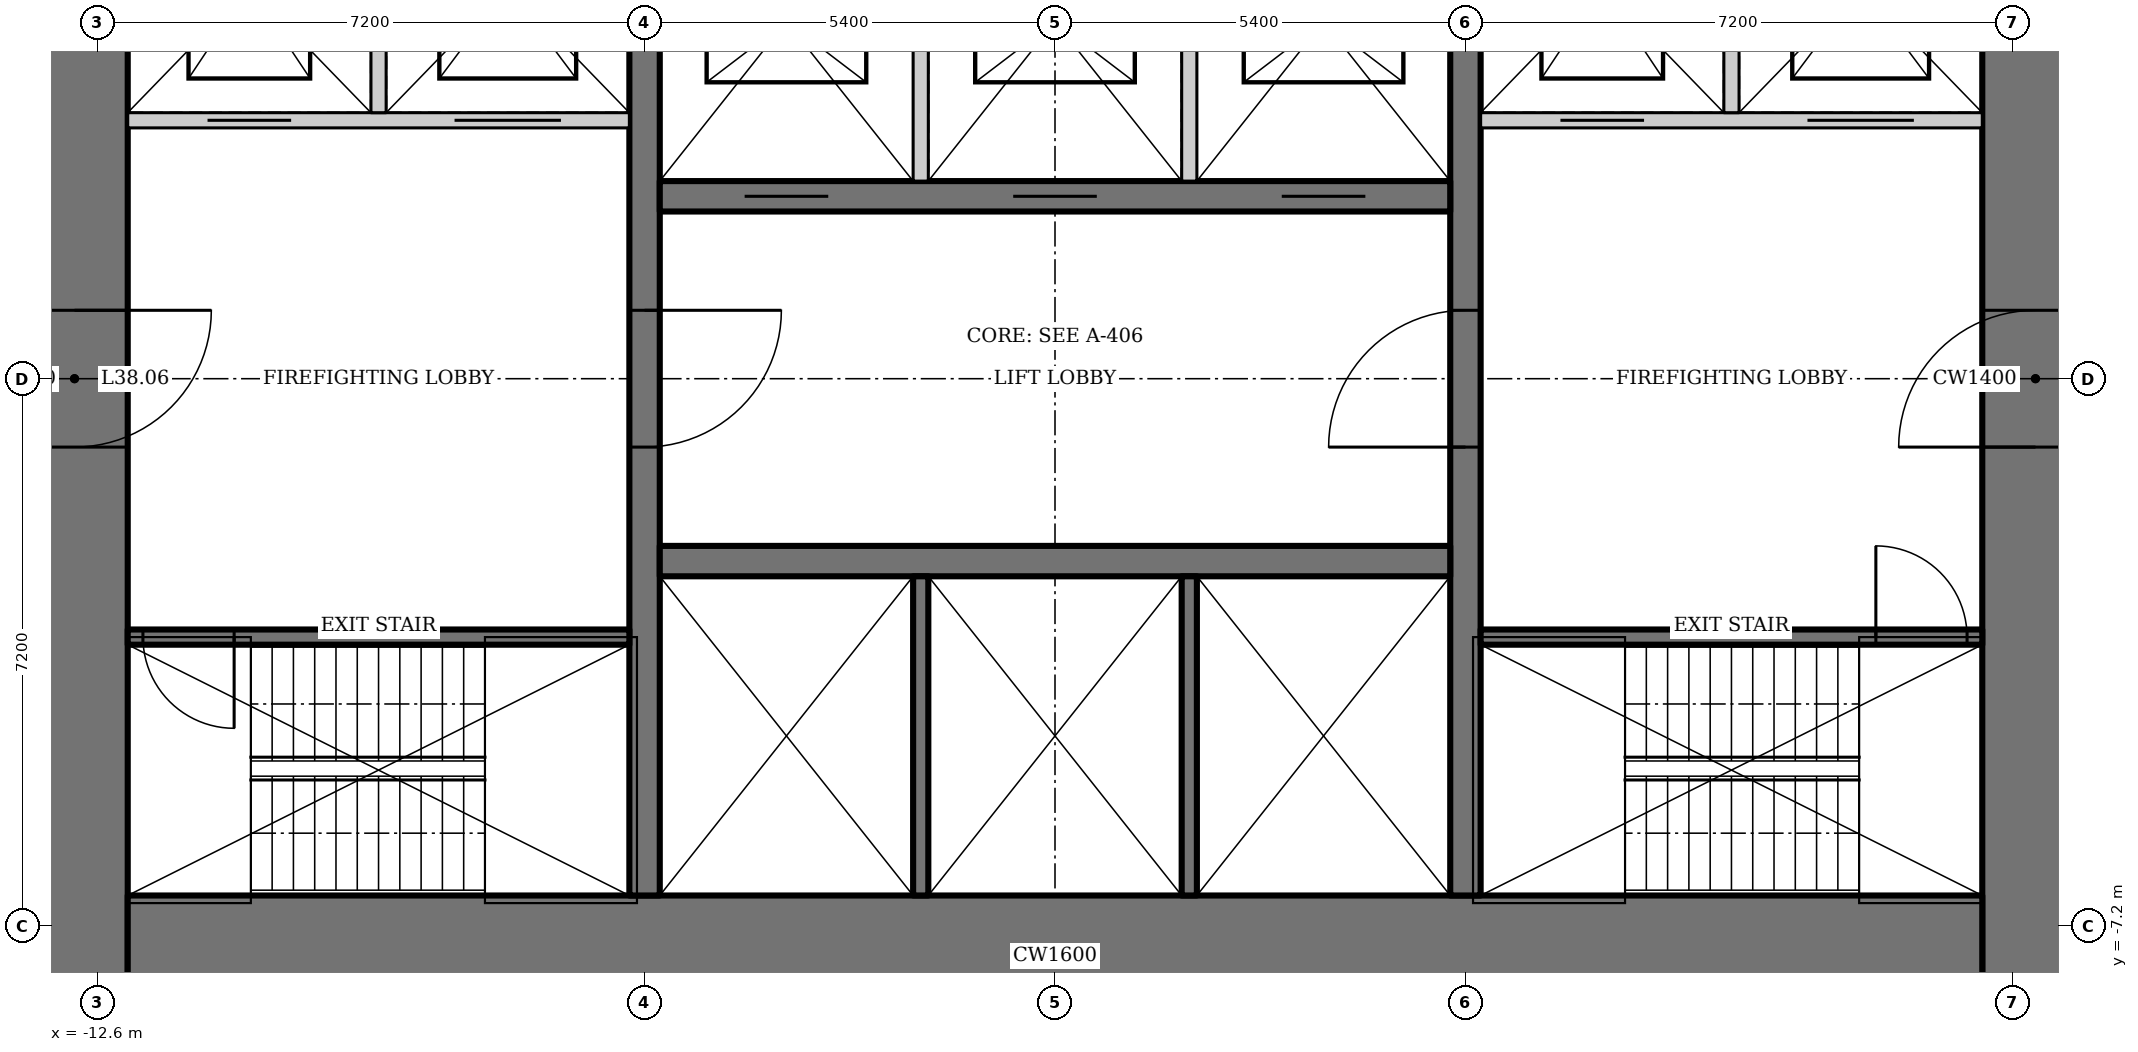
"""IFC4 building model, lengths in metres.
Left out: names, types, materials, properties, quantities, classifications, styles, units other than length and angle.
Written with IfcOpenShell. Run it as: python <this file> out.ifc"""

import sys

from ifc_helpers import new_model, si_unit, direction, frame, frame_2d, origin, place, context, subcontext, project, spatial, rectangle, extrude, element, fill, save


model = new_model("IFC4")
c1 = context("Model", 3, precision=1e-05, world=origin(), true_north=direction((0.0, 1.0)))
c2 = subcontext(c1, "Body", "Model", "MODEL_VIEW")
j1 = project(units=[si_unit("LENGTHUNIT", "METRE"), si_unit("PLANEANGLEUNIT", "RADIAN")], contexts=[c1])
p1 = place(None, origin())
s1 = spatial("IfcSite", under=j1, at=p1, CompositionType="ELEMENT")
p2 = place(p1, origin())
s2 = spatial("IfcBuilding", under=s1, at=p2, CompositionType="ELEMENT")
p3 = place(p2, frame((0.0, 0.0, 163.6)))
s3 = spatial("IfcBuildingStorey", under=s2, at=p3, CompositionType="ELEMENT", Elevation=163.6)
p4 = place(p3, frame((12.9, -13.0, 0.0), z_axis=(0.0, 0.0, 1.0), x_axis=(0.0, 1.0, 0.0)))
e1 = element("IfcWall", 1, at=p4, inside=s3, PredefinedType="SHEAR", context=c2, shape_type="SweptSolid", body=[
    extrude(rectangle(XDim=26.0, YDim=1.4, at=frame_2d((13.0, 0.0))), origin(), (0.0, 0.0, 1.0), 4.2),
])
p5 = place(p4, frame((12.1, 0.0, 0.0)))
e2 = element("IfcOpeningElement", 2, at=p5, cuts=e1, PredefinedType="OPENING", context=c2, shape_type="SweptSolid", body=[
    extrude(rectangle(XDim=1.8, YDim=2.1, at=frame_2d((0.9, 1.05))), frame((0.0, 0.71, 0.0), z_axis=(0.0, -1.0, 0.0), x_axis=(1.0, 0.0, 0.0)), (0.0, 0.0, 1.0), 1.42),
])
p6 = place(p3, frame((-12.9, 13.0, 0.0), z_axis=(0.0, 0.0, 1.0), x_axis=(0.0, -1.0, 0.0)))
e3 = element("IfcWall", 3, at=p6, inside=s3, PredefinedType="SHEAR", context=c2, shape_type="SweptSolid", body=[
    extrude(rectangle(XDim=26.0, YDim=1.4, at=frame_2d((13.0, 0.0))), origin(), (0.0, 0.0, 1.0), 4.2),
])
p7 = place(p6, frame((12.1, 0.0, 0.0)))
e4 = element("IfcOpeningElement", 4, at=p7, cuts=e3, PredefinedType="OPENING", context=c2, shape_type="SweptSolid", body=[
    extrude(rectangle(XDim=1.8, YDim=2.1, at=frame_2d((0.9, 1.05))), frame((0.0, 0.71, 0.0), z_axis=(0.0, -1.0, 0.0), x_axis=(1.0, 0.0, 0.0)), (0.0, 0.0, 1.0), 1.42),
])
p8 = place(p3, frame((-12.2, -7.6, 0.0), z_axis=(0.0, 0.0, 1.0), x_axis=(1.0, 0.0, 0.0)))
e5 = element("IfcWall", 5, at=p8, inside=s3, PredefinedType="SHEAR", context=c2, shape_type="SweptSolid", body=[
    extrude(rectangle(XDim=24.4, YDim=1.6, at=frame_2d((12.2, 0.0))), origin(), (0.0, 0.0, 1.0), 4.2),
])
p9 = place(p3, frame((5.4, -6.8, 0.0), z_axis=(0.0, 0.0, 1.0), x_axis=(0.0, 1.0, 0.0)))
e6 = element("IfcWall", 6, at=p9, inside=s3, PredefinedType="SHEAR", context=c2, shape_type="SweptSolid", body=[
    extrude(rectangle(XDim=13.6, YDim=0.4, at=frame_2d((6.8, 0.0))), origin(), (0.0, 0.0, 1.0), 4.2),
])
p10 = place(p9, frame((5.9, 0.0, 0.0)))
e7 = element("IfcOpeningElement", 7, at=p10, cuts=e6, PredefinedType="OPENING", context=c2, shape_type="SweptSolid", body=[
    extrude(rectangle(XDim=1.8, YDim=2.1, at=frame_2d((0.9, 1.05))), frame((0.0, 0.21, 0.0), z_axis=(0.0, -1.0, 0.0), x_axis=(1.0, 0.0, 0.0)), (0.0, 0.0, 1.0), 0.42),
])
p11 = place(p3, frame((-5.4, 6.8, 0.0), z_axis=(0.0, 0.0, 1.0), x_axis=(0.0, -1.0, 0.0)))
e8 = element("IfcWall", 8, at=p11, inside=s3, PredefinedType="SHEAR", context=c2, shape_type="SweptSolid", body=[
    extrude(rectangle(XDim=13.6, YDim=0.4, at=frame_2d((6.8, 0.0))), origin(), (0.0, 0.0, 1.0), 4.2),
])
p12 = place(p11, frame((5.9, 0.0, 0.0)))
e9 = element("IfcOpeningElement", 9, at=p12, cuts=e8, PredefinedType="OPENING", context=c2, shape_type="SweptSolid", body=[
    extrude(rectangle(XDim=1.8, YDim=2.1, at=frame_2d((0.9, 1.05))), frame((0.0, 0.21, 0.0), z_axis=(0.0, -1.0, 0.0), x_axis=(1.0, 0.0, 0.0)), (0.0, 0.0, 1.0), 0.42),
])
p13 = place(p3, frame((-5.2, -2.4, 0.0), z_axis=(0.0, 0.0, 1.0), x_axis=(1.0, 0.0, 0.0)))
e10 = element("IfcWall", 10, at=p13, inside=s3, PredefinedType="SHEAR", context=c2, shape_type="SweptSolid", body=[
    extrude(rectangle(XDim=10.4, YDim=0.4, at=frame_2d((5.2, 0.0))), origin(), (0.0, 0.0, 1.0), 4.2),
])
for number, where, z_axis, x_axis in (
    (11, (-1.767, -2.6, 0.0), (0.0, 0.0, 1.0), (0.0, -1.0, 0.0)),
    (12, (1.767, -2.6, 0.0), (0.0, 0.0, 1.0), (0.0, -1.0, 0.0)),
):
    element("IfcWall", number, at=place(p3, frame(where, z_axis=z_axis, x_axis=x_axis)), inside=s3, PredefinedType="SOLIDWALL", context=c2, shape_type="SweptSolid", body=[
        extrude(rectangle(XDim=4.2, YDim=0.2, at=frame_2d((2.1, 0.0))), origin(), (0.0, 0.0, 1.0), 4.2),
    ])
p14 = place(p3, frame((5.2, 2.4, 0.0), z_axis=(0.0, 0.0, 1.0), x_axis=(-1.0, 0.0, 0.0)))
e13 = element("IfcWall", 13, at=p14, inside=s3, PredefinedType="SHEAR", context=c2, shape_type="SweptSolid", body=[
    extrude(rectangle(XDim=10.4, YDim=0.4, at=frame_2d((5.2, 0.0))), origin(), (0.0, 0.0, 1.0), 4.2),
])
p15 = place(p14, frame((8.183, 0.0, 0.0)))
e14 = element("IfcOpeningElement", 14, at=p15, cuts=e13, PredefinedType="OPENING", context=c2, shape_type="SweptSolid", body=[
    extrude(rectangle(XDim=1.1, YDim=2.2, at=frame_2d((0.55, 1.1))), frame((0.0, 0.21, 0.0), z_axis=(0.0, -1.0, 0.0), x_axis=(1.0, 0.0, 0.0)), (0.0, 0.0, 1.0), 0.42),
])
p16 = place(p14, frame((4.65, 0.0, 0.0)))
e15 = element("IfcOpeningElement", 15, at=p16, cuts=e13, PredefinedType="OPENING", context=c2, shape_type="SweptSolid", body=[
    extrude(rectangle(XDim=1.1, YDim=2.2, at=frame_2d((0.55, 1.1))), frame((0.0, 0.21, 0.0), z_axis=(0.0, -1.0, 0.0), x_axis=(1.0, 0.0, 0.0)), (0.0, 0.0, 1.0), 0.42),
])
p17 = place(p14, frame((1.117, 0.0, 0.0)))
e16 = element("IfcOpeningElement", 16, at=p17, cuts=e13, PredefinedType="OPENING", context=c2, shape_type="SweptSolid", body=[
    extrude(rectangle(XDim=1.1, YDim=2.2, at=frame_2d((0.55, 1.1))), frame((0.0, 0.21, 0.0), z_axis=(0.0, -1.0, 0.0), x_axis=(1.0, 0.0, 0.0)), (0.0, 0.0, 1.0), 0.42),
])
for number, where, z_axis, x_axis in (
    (17, (-1.767, 2.6, 0.0), (0.0, 0.0, 1.0), (0.0, 1.0, 0.0)),
    (18, (1.767, 2.6, 0.0), (0.0, 0.0, 1.0), (0.0, 1.0, 0.0)),
):
    element("IfcWall", number, at=place(p3, frame(where, z_axis=z_axis, x_axis=x_axis)), inside=s3, PredefinedType="SOLIDWALL", context=c2, shape_type="SweptSolid", body=[
        extrude(rectangle(XDim=4.2, YDim=0.2, at=frame_2d((2.1, 0.0))), origin(), (0.0, 0.0, 1.0), 4.2),
    ])
p18 = place(p3, frame((5.6, -3.4, 0.0), z_axis=(0.0, 0.0, 1.0), x_axis=(1.0, 0.0, 0.0)))
e19 = element("IfcWall", 19, at=p18, inside=s3, PredefinedType="SHEAR", context=c2, shape_type="SweptSolid", body=[
    extrude(rectangle(XDim=6.6, YDim=0.2, at=frame_2d((3.3, 0.0))), origin(), (0.0, 0.0, 1.0), 4.2),
])
p19 = place(p18, frame((5.2, 0.0, 0.0)))
e20 = element("IfcOpeningElement", 20, at=p19, cuts=e19, PredefinedType="OPENING", context=c2, shape_type="SweptSolid", body=[
    extrude(rectangle(XDim=1.2, YDim=2.1, at=frame_2d((0.6, 1.05))), frame((0.0, 0.11, 0.0), z_axis=(0.0, -1.0, 0.0), x_axis=(1.0, 0.0, 0.0)), (0.0, 0.0, 1.0), 0.22),
])
p20 = place(p3, frame((12.2, 3.4, 0.0), z_axis=(0.0, 0.0, 1.0), x_axis=(-1.0, 0.0, 0.0)))
e21 = element("IfcWall", 21, at=p20, inside=s3, PredefinedType="SOLIDWALL", context=c2, shape_type="SweptSolid", body=[
    extrude(rectangle(XDim=6.6, YDim=0.2, at=frame_2d((3.3, 0.0))), origin(), (0.0, 0.0, 1.0), 4.2),
])
p21 = place(p20, frame((4.45, 0.0, 0.0)))
e22 = element("IfcOpeningElement", 22, at=p21, cuts=e21, PredefinedType="OPENING", context=c2, shape_type="SweptSolid", body=[
    extrude(rectangle(XDim=1.1, YDim=2.2, at=frame_2d((0.55, 1.1))), frame((0.0, 0.11, 0.0), z_axis=(0.0, -1.0, 0.0), x_axis=(1.0, 0.0, 0.0)), (0.0, 0.0, 1.0), 0.22),
])
p22 = place(p20, frame((0.9, 0.0, 0.0)))
e23 = element("IfcOpeningElement", 23, at=p22, cuts=e21, PredefinedType="OPENING", context=c2, shape_type="SweptSolid", body=[
    extrude(rectangle(XDim=1.4, YDim=2.2, at=frame_2d((0.7, 1.1))), frame((0.0, 0.11, 0.0), z_axis=(0.0, -1.0, 0.0), x_axis=(1.0, 0.0, 0.0)), (0.0, 0.0, 1.0), 0.22),
])
p23 = place(p3, frame((8.9, 3.5, 0.0), z_axis=(0.0, 0.0, 1.0), x_axis=(0.0, 1.0, 0.0)))
e24 = element("IfcWall", 24, at=p23, inside=s3, PredefinedType="SOLIDWALL", context=c2, shape_type="SweptSolid", body=[
    extrude(rectangle(XDim=3.3, YDim=0.2, at=frame_2d((1.65, 0.0))), origin(), (0.0, 0.0, 1.0), 4.2),
])
p24 = place(p3, frame((-5.6, -3.4, 0.0), z_axis=(0.0, 0.0, 1.0), x_axis=(-1.0, 0.0, 0.0)))
e25 = element("IfcWall", 25, at=p24, inside=s3, PredefinedType="SHEAR", context=c2, shape_type="SweptSolid", body=[
    extrude(rectangle(XDim=6.6, YDim=0.2, at=frame_2d((3.3, 0.0))), origin(), (0.0, 0.0, 1.0), 4.2),
])
p25 = place(p24, frame((5.2, 0.0, 0.0)))
e26 = element("IfcOpeningElement", 26, at=p25, cuts=e25, PredefinedType="OPENING", context=c2, shape_type="SweptSolid", body=[
    extrude(rectangle(XDim=1.2, YDim=2.1, at=frame_2d((0.6, 1.05))), frame((0.0, 0.11, 0.0), z_axis=(0.0, -1.0, 0.0), x_axis=(1.0, 0.0, 0.0)), (0.0, 0.0, 1.0), 0.22),
])
p26 = place(p3, frame((-12.2, 3.4, 0.0), z_axis=(0.0, 0.0, 1.0), x_axis=(1.0, 0.0, 0.0)))
e27 = element("IfcWall", 27, at=p26, inside=s3, PredefinedType="SOLIDWALL", context=c2, shape_type="SweptSolid", body=[
    extrude(rectangle(XDim=6.6, YDim=0.2, at=frame_2d((3.3, 0.0))), origin(), (0.0, 0.0, 1.0), 4.2),
])
p27 = place(p26, frame((1.05, 0.0, 0.0)))
e28 = element("IfcOpeningElement", 28, at=p27, cuts=e27, PredefinedType="OPENING", context=c2, shape_type="SweptSolid", body=[
    extrude(rectangle(XDim=1.1, YDim=2.2, at=frame_2d((0.55, 1.1))), frame((0.0, 0.11, 0.0), z_axis=(0.0, -1.0, 0.0), x_axis=(1.0, 0.0, 0.0)), (0.0, 0.0, 1.0), 0.22),
])
p28 = place(p26, frame((4.3, 0.0, 0.0)))
e29 = element("IfcOpeningElement", 29, at=p28, cuts=e27, PredefinedType="OPENING", context=c2, shape_type="SweptSolid", body=[
    extrude(rectangle(XDim=1.4, YDim=2.2, at=frame_2d((0.7, 1.1))), frame((0.0, 0.11, 0.0), z_axis=(0.0, -1.0, 0.0), x_axis=(1.0, 0.0, 0.0)), (0.0, 0.0, 1.0), 0.22),
])
p29 = place(p3, frame((-8.9, 3.5, 0.0), z_axis=(0.0, 0.0, 1.0), x_axis=(0.0, 1.0, 0.0)))
e30 = element("IfcWall", 30, at=p29, inside=s3, PredefinedType="SOLIDWALL", context=c2, shape_type="SweptSolid", body=[
    extrude(rectangle(XDim=3.3, YDim=0.2, at=frame_2d((1.65, 0.0))), origin(), (0.0, 0.0, 1.0), 4.2),
])
p30 = place(p10, origin())
e31 = element("IfcDoor", 31, at=p30, inside=s3, OperationType="DOUBLE_DOOR_DOUBLE_SWING", PredefinedType="DOOR", context=c2, shape_type="SweptSolid", body=[
    extrude(rectangle(XDim=1.8, YDim=2.1, at=frame_2d((0.9, 1.05))), frame((0.0, 0.025, 0.0), z_axis=(0.0, -1.0, 0.0), x_axis=(1.0, 0.0, 0.0)), (0.0, 0.0, 1.0), 0.05),
])
fill(e7, e31)
p31 = place(p12, origin())
e32 = element("IfcDoor", 32, at=p31, inside=s3, OperationType="DOUBLE_DOOR_DOUBLE_SWING", PredefinedType="DOOR", context=c2, shape_type="SweptSolid", body=[
    extrude(rectangle(XDim=1.8, YDim=2.1, at=frame_2d((0.9, 1.05))), frame((0.0, 0.025, 0.0), z_axis=(0.0, -1.0, 0.0), x_axis=(1.0, 0.0, 0.0)), (0.0, 0.0, 1.0), 0.05),
])
fill(e9, e32)
p32 = place(p19, origin())
e33 = element("IfcDoor", 33, at=p32, inside=s3, OperationType="SINGLE_SWING_RIGHT", PredefinedType="DOOR", context=c2, shape_type="SweptSolid", body=[
    extrude(rectangle(XDim=1.2, YDim=2.1, at=frame_2d((0.6, 1.05))), frame((0.0, 0.025, 0.0), z_axis=(0.0, -1.0, 0.0), x_axis=(1.0, 0.0, 0.0)), (0.0, 0.0, 1.0), 0.05),
])
fill(e20, e33)
p33 = place(p25, origin())
e34 = element("IfcDoor", 34, at=p33, inside=s3, OperationType="SINGLE_SWING_RIGHT", PredefinedType="DOOR", context=c2, shape_type="SweptSolid", body=[
    extrude(rectangle(XDim=1.2, YDim=2.1, at=frame_2d((0.6, 1.05))), frame((0.0, 0.025, 0.0), z_axis=(0.0, -1.0, 0.0), x_axis=(1.0, 0.0, 0.0)), (0.0, 0.0, 1.0), 0.05),
])
fill(e26, e34)
p34 = place(p5, origin())
e35 = element("IfcDoor", 35, at=p34, inside=s3, OperationType="DOUBLE_DOOR_DOUBLE_SWING", PredefinedType="DOOR", context=c2, shape_type="SweptSolid", body=[
    extrude(rectangle(XDim=1.8, YDim=2.1, at=frame_2d((0.9, 1.05))), frame((0.0, 0.025, 0.0), z_axis=(0.0, -1.0, 0.0), x_axis=(1.0, 0.0, 0.0)), (0.0, 0.0, 1.0), 0.05),
])
fill(e2, e35)
p35 = place(p7, origin())
e36 = element("IfcDoor", 36, at=p35, inside=s3, OperationType="DOUBLE_DOOR_DOUBLE_SWING", PredefinedType="DOOR", context=c2, shape_type="SweptSolid", body=[
    extrude(rectangle(XDim=1.8, YDim=2.1, at=frame_2d((0.9, 1.05))), frame((0.0, 0.025, 0.0), z_axis=(0.0, -1.0, 0.0), x_axis=(1.0, 0.0, 0.0)), (0.0, 0.0, 1.0), 0.05),
])
fill(e4, e36)
p36 = place(p15, origin())
e37 = element("IfcDoor", 37, at=p36, inside=s3, OperationType="DOUBLE_DOOR_SLIDING", PredefinedType="DOOR", context=c2, shape_type="SweptSolid", body=[
    extrude(rectangle(XDim=1.1, YDim=2.2, at=frame_2d((0.55, 1.1))), frame((0.0, 0.025, 0.0), z_axis=(0.0, -1.0, 0.0), x_axis=(1.0, 0.0, 0.0)), (0.0, 0.0, 1.0), 0.05),
])
fill(e14, e37)
p37 = place(p16, origin())
e38 = element("IfcDoor", 38, at=p37, inside=s3, OperationType="DOUBLE_DOOR_SLIDING", PredefinedType="DOOR", context=c2, shape_type="SweptSolid", body=[
    extrude(rectangle(XDim=1.1, YDim=2.2, at=frame_2d((0.55, 1.1))), frame((0.0, 0.025, 0.0), z_axis=(0.0, -1.0, 0.0), x_axis=(1.0, 0.0, 0.0)), (0.0, 0.0, 1.0), 0.05),
])
fill(e15, e38)
p38 = place(p17, origin())
e39 = element("IfcDoor", 39, at=p38, inside=s3, OperationType="DOUBLE_DOOR_SLIDING", PredefinedType="DOOR", context=c2, shape_type="SweptSolid", body=[
    extrude(rectangle(XDim=1.1, YDim=2.2, at=frame_2d((0.55, 1.1))), frame((0.0, 0.025, 0.0), z_axis=(0.0, -1.0, 0.0), x_axis=(1.0, 0.0, 0.0)), (0.0, 0.0, 1.0), 0.05),
])
fill(e16, e39)
p39 = place(p27, origin())
e40 = element("IfcDoor", 40, at=p39, inside=s3, OperationType="DOUBLE_DOOR_SLIDING", PredefinedType="DOOR", context=c2, shape_type="SweptSolid", body=[
    extrude(rectangle(XDim=1.1, YDim=2.2, at=frame_2d((0.55, 1.1))), frame((0.0, 0.025, 0.0), z_axis=(0.0, -1.0, 0.0), x_axis=(1.0, 0.0, 0.0)), (0.0, 0.0, 1.0), 0.05),
])
fill(e28, e40)
p40 = place(p28, origin())
e41 = element("IfcDoor", 41, at=p40, inside=s3, OperationType="DOUBLE_DOOR_SLIDING", PredefinedType="DOOR", context=c2, shape_type="SweptSolid", body=[
    extrude(rectangle(XDim=1.4, YDim=2.2, at=frame_2d((0.7, 1.1))), frame((0.0, 0.025, 0.0), z_axis=(0.0, -1.0, 0.0), x_axis=(1.0, 0.0, 0.0)), (0.0, 0.0, 1.0), 0.05),
])
fill(e29, e41)
p41 = place(p21, origin())
e42 = element("IfcDoor", 42, at=p41, inside=s3, OperationType="DOUBLE_DOOR_SLIDING", PredefinedType="DOOR", context=c2, shape_type="SweptSolid", body=[
    extrude(rectangle(XDim=1.1, YDim=2.2, at=frame_2d((0.55, 1.1))), frame((0.0, 0.025, 0.0), z_axis=(0.0, -1.0, 0.0), x_axis=(1.0, 0.0, 0.0)), (0.0, 0.0, 1.0), 0.05),
])
fill(e22, e42)
p42 = place(p22, origin())
e43 = element("IfcDoor", 43, at=p42, inside=s3, OperationType="DOUBLE_DOOR_SLIDING", PredefinedType="DOOR", context=c2, shape_type="SweptSolid", body=[
    extrude(rectangle(XDim=1.4, YDim=2.2, at=frame_2d((0.7, 1.1))), frame((0.0, 0.025, 0.0), z_axis=(0.0, -1.0, 0.0), x_axis=(1.0, 0.0, 0.0)), (0.0, 0.0, 1.0), 0.05),
])
fill(e23, e43)
save(model, sys.argv[1])
